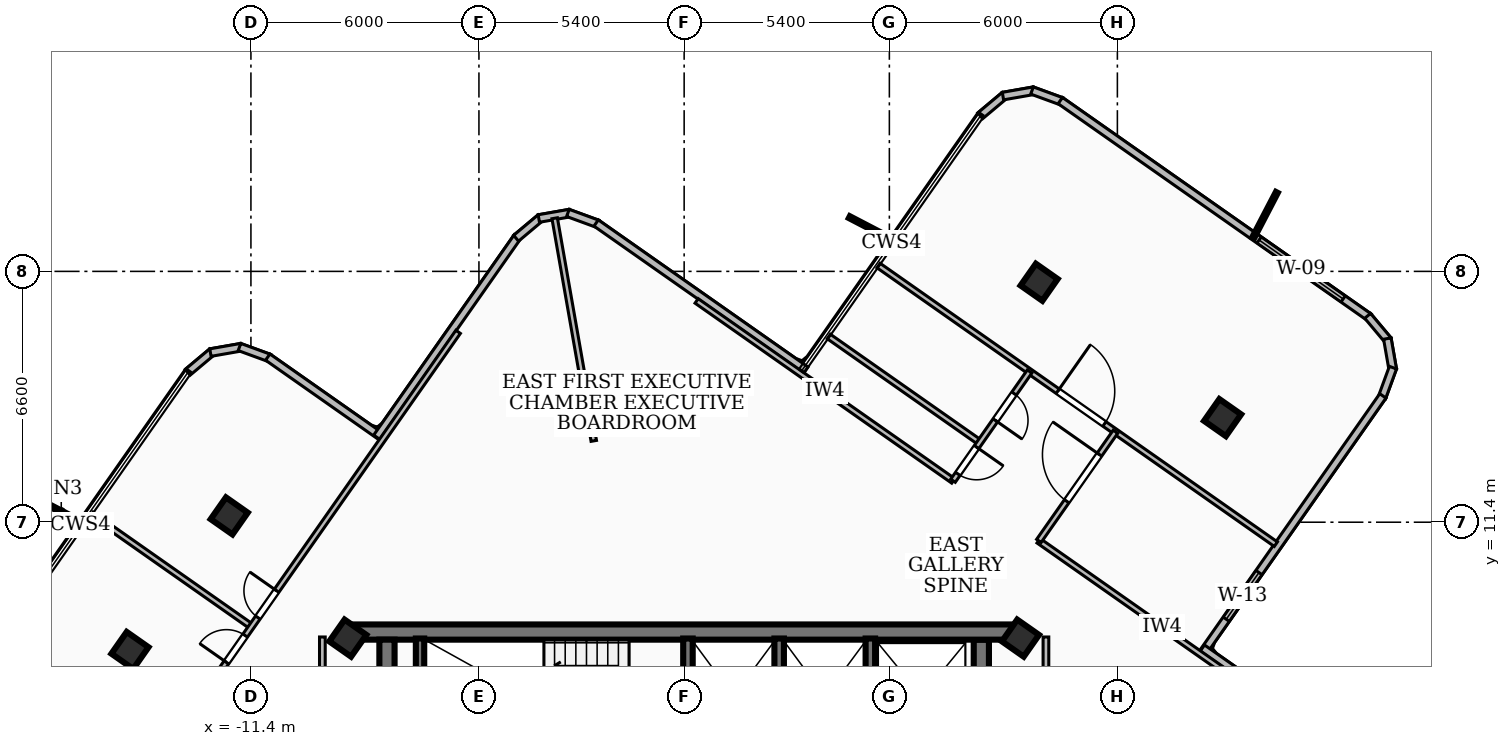
"""IFC4 building model, lengths in metres.
Left out: names, types, materials, properties, quantities, classifications, styles, units other than length and angle.
Written with IfcOpenShell. Run it as: python <this file> out.ifc"""

import sys

from ifc_helpers import new_model, si_unit, direction, frame, frame_2d, origin, origin_2d, place, context, subcontext, project, spatial, rectangle, extrude, element, fill, save


model = new_model("IFC4")
c1 = context("Model", 3, precision=1e-05, world=origin(), true_north=direction((0.0, 1.0)))
c2 = subcontext(c1, "Body", "Model", "MODEL_VIEW")
j1 = project(units=[si_unit("LENGTHUNIT", "METRE"), si_unit("PLANEANGLEUNIT", "RADIAN")], contexts=[c1])
p1 = place(None, origin())
s1 = spatial("IfcSite", under=j1, at=p1, CompositionType="ELEMENT")
p2 = place(p1, origin())
s2 = spatial("IfcBuilding", under=s1, at=p2, CompositionType="ELEMENT")
p3 = place(p2, frame((0.0, 0.0, 268.02)))
s3 = spatial("IfcBuildingStorey", under=s2, at=p3, CompositionType="ELEMENT", Elevation=268.02)
p4 = place(p3, frame((-8.78, 8.51, 0.0), z_axis=(0.0, 0.0, 1.0), x_axis=(1.0, 0.0, 0.0)))
e1 = element("IfcWall", 1, at=p4, inside=s3, PredefinedType="SHEAR", context=c2, shape_type="SweptSolid", body=[
    extrude(rectangle(XDim=17.56, YDim=0.4, at=frame_2d((8.78, 0.0))), origin(), (0.0, 0.0, 1.0), 3.16),
])
for number, where, z_axis, x_axis in (
    (2, (-7.82, 1.95, 0.0), (0.0, 0.0, 1.0), (0.0, 1.0, 0.0)),
    (3, (7.82, 8.31, 0.0), (0.0, 0.0, 1.0), (0.0, -1.0, 0.0)),
):
    element("IfcWall", number, at=place(p3, frame(where, z_axis=z_axis, x_axis=x_axis)), inside=s3, PredefinedType="SHEAR", context=c2, shape_type="SweptSolid", body=[
        extrude(rectangle(XDim=6.36, YDim=0.4, at=frame_2d((3.18, 0.0))), origin(), (0.0, 0.0, 1.0), 3.16),
    ])
p5 = place(p3, frame((-6.95, 5.28, 0.0), z_axis=(0.0, 0.0, 1.0), x_axis=(0.0, 1.0, 0.0)))
e4 = element("IfcWall", 4, at=p5, inside=s3, PredefinedType="SOLIDWALL", context=c2, shape_type="SweptSolid", body=[
    extrude(rectangle(XDim=3.06, YDim=0.22, at=frame_2d((1.53, 0.0))), origin(), (0.0, 0.0, 1.0), 3.16),
])
for number, where, z_axis, x_axis in (
    (5, (0.1, 5.3, 0.0), (0.0, 0.0, 1.0), (0.0, 1.0, 0.0)),
    (6, (2.5, 5.3, 0.0), (0.0, 0.0, 1.0), (0.0, 1.0, 0.0)),
    (7, (4.9, 5.3, 0.0), (0.0, 0.0, 1.0), (0.0, 1.0, 0.0)),
):
    element("IfcWall", number, at=place(p3, frame(where, z_axis=z_axis, x_axis=x_axis)), inside=s3, PredefinedType="SOLIDWALL", context=c2, shape_type="SweptSolid", body=[
        extrude(rectangle(XDim=3.04, YDim=0.25, at=frame_2d((1.52, 0.0))), origin(), (0.0, 0.0, 1.0), 3.16),
    ])
for number, where, z_axis, x_axis in (
    (8, (-8.85, 8.35, 0.0), (0.0, 0.0, 1.0), (0.574, 0.819, 0.0)),
    (9, (8.85, 8.35, 0.0), (0.0, 0.0, 1.0), (0.574, 0.819, 0.0)),
    (10, (14.169, 14.152, 0.0), (0.0, 0.0, 1.0), (0.574, 0.819, 0.0)),
    (11, (9.341, 17.714, 0.0), (0.0, 0.0, 1.0), (0.574, 0.819, 0.0)),
    (12, (-11.971, 11.566, 0.0), (0.0, 0.0, 1.0), (0.574, 0.819, 0.0)),
    (13, (-14.583, 8.026, 0.0), (0.0, 0.0, 1.0), (0.574, 0.819, 0.0)),
):
    element("IfcColumn", number, at=place(p3, frame(where, z_axis=z_axis, x_axis=x_axis)), inside=s3, PredefinedType="COLUMN", context=c2, shape_type="SweptSolid", body=[
        extrude(rectangle(XDim=0.7, YDim=0.7, at=origin_2d()), origin(), (0.0, 0.0, 1.0), 3.42),
    ])
p6 = place(p3, frame((-13.064, 15.345, 0.0), z_axis=(0.0, 0.0, 1.0), x_axis=(0.766330415365, 0.642446647191, 0.0)))
e14 = element("IfcWall", 14, at=p6, inside=s3, PredefinedType="SOLIDWALL", context=c2, shape_type="SweptSolid", body=[
    extrude(rectangle(XDim=0.838, YDim=0.2, at=frame_2d((0.419, 0.0))), origin(), (0.0, 0.0, 1.0), 3.16),
])
p7 = place(p3, frame((-12.466, 15.863, 0.0), z_axis=(0.0, 0.0, 1.0), x_axis=(0.985118245285, 0.171877988141, 0.0)))
e15 = element("IfcWall", 15, at=p7, inside=s3, PredefinedType="SOLIDWALL", context=c2, shape_type="SweptSolid", body=[
    extrude(rectangle(XDim=0.825, YDim=0.2, at=frame_2d((0.413, 0.0))), origin(), (0.0, 0.0, 1.0), 3.16),
])
p8 = place(p3, frame((-11.701, 16.01, 0.0), z_axis=(0.0, 0.0, 1.0), x_axis=(0.939042573482, -0.343800880145, 0.0)))
e16 = element("IfcWall", 16, at=p8, inside=s3, PredefinedType="SOLIDWALL", context=c2, shape_type="SweptSolid", body=[
    extrude(rectangle(XDim=0.838, YDim=0.2, at=frame_2d((0.419, 0.0))), origin(), (0.0, 0.0, 1.0), 3.16),
])
p9 = place(p3, frame((-10.957, 15.745, 0.0), z_axis=(0.0, 0.0, 1.0), x_axis=(0.818576054501, -0.574398157202, 0.0)))
e17 = element("IfcWall", 17, at=p9, inside=s3, PredefinedType="SOLIDWALL", context=c2, shape_type="SweptSolid", body=[
    extrude(rectangle(XDim=3.64, YDim=0.2, at=frame_2d((1.82, 0.0))), origin(), (0.0, 0.0, 1.0), 3.16),
])
p10 = place(p3, frame((-8.088, 13.635, 0.0), z_axis=(0.0, 0.0, 1.0), x_axis=(0.574286279317, 0.818654548261, 0.0)))
e18 = element("IfcWall", 18, at=p10, inside=s3, PredefinedType="SOLIDWALL", context=c2, shape_type="SweptSolid", body=[
    extrude(rectangle(XDim=6.441, YDim=0.2, at=frame_2d((3.22, 0.0))), origin(), (0.0, 0.0, 1.0), 3.16),
])
p11 = place(p3, frame((-4.422, 18.872, 0.0), z_axis=(0.0, 0.0, 1.0), x_axis=(0.766020352528, 0.642816318642, 0.0)))
e19 = element("IfcWall", 19, at=p11, inside=s3, PredefinedType="SOLIDWALL", context=c2, shape_type="SweptSolid", body=[
    extrude(rectangle(XDim=0.838, YDim=0.2, at=frame_2d((0.419, 0.0))), origin(), (0.0, 0.0, 1.0), 3.16),
])
p12 = place(p3, frame((-3.824, 19.391, 0.0), z_axis=(0.0, 0.0, 1.0), x_axis=(0.985118245285, 0.171877988141, 0.0)))
e20 = element("IfcWall", 20, at=p12, inside=s3, PredefinedType="SOLIDWALL", context=c2, shape_type="SweptSolid", body=[
    extrude(rectangle(XDim=0.825, YDim=0.2, at=frame_2d((0.413, 0.0))), origin(), (0.0, 0.0, 1.0), 3.16),
])
p13 = place(p3, frame((-3.059, 19.538, 0.0), z_axis=(0.0, 0.0, 1.0), x_axis=(0.938939131905, -0.344083284363, 0.0)))
e21 = element("IfcWall", 21, at=p13, inside=s3, PredefinedType="SOLIDWALL", context=c2, shape_type="SweptSolid", body=[
    extrude(rectangle(XDim=0.837, YDim=0.2, at=frame_2d((0.418, 0.0))), origin(), (0.0, 0.0, 1.0), 3.16),
])
p14 = place(p3, frame((-2.316, 19.273, 0.0), z_axis=(0.0, 0.0, 1.0), x_axis=(0.818695592978, -0.574227764949, 0.0)))
e22 = element("IfcWall", 22, at=p14, inside=s3, PredefinedType="SOLIDWALL", context=c2, shape_type="SweptSolid", body=[
    extrude(rectangle(XDim=6.741, YDim=0.2, at=frame_2d((3.371, 0.0))), origin(), (0.0, 0.0, 1.0), 3.16),
])
p15 = place(p3, frame((7.791, 22.094, 0.0), z_axis=(0.0, 0.0, 1.0), x_axis=(0.766450684477, 0.642303159159, 0.0)))
e23 = element("IfcWall", 23, at=p15, inside=s3, PredefinedType="SOLIDWALL", context=c2, shape_type="SweptSolid", body=[
    extrude(rectangle(XDim=0.838, YDim=0.2, at=frame_2d((0.419, 0.0))), origin(), (0.0, 0.0, 1.0), 3.16),
])
p16 = place(p3, frame((8.389, 22.612, 0.0), z_axis=(0.0, 0.0, 1.0), x_axis=(0.985118245285, 0.171877988141, 0.0)))
e24 = element("IfcWall", 24, at=p16, inside=s3, PredefinedType="SOLIDWALL", context=c2, shape_type="SweptSolid", body=[
    extrude(rectangle(XDim=0.825, YDim=0.2, at=frame_2d((0.413, 0.0))), origin(), (0.0, 0.0, 1.0), 3.16),
])
p17 = place(p3, frame((9.154, 22.759, 0.0), z_axis=(0.0, 0.0, 1.0), x_axis=(0.939042573482, -0.343800880145, 0.0)))
e25 = element("IfcWall", 25, at=p17, inside=s3, PredefinedType="SOLIDWALL", context=c2, shape_type="SweptSolid", body=[
    extrude(rectangle(XDim=0.838, YDim=0.2, at=frame_2d((0.419, 0.0))), origin(), (0.0, 0.0, 1.0), 3.16),
])
p18 = place(p3, frame((9.898, 22.494, 0.0), z_axis=(0.0, 0.0, 1.0), x_axis=(0.818760017785, -0.5741359014, 0.0)))
e26 = element("IfcWall", 26, at=p18, inside=s3, PredefinedType="SOLIDWALL", context=c2, shape_type="SweptSolid", body=[
    extrude(rectangle(XDim=9.922, YDim=0.2, at=frame_2d((4.961, 0.0))), origin(), (0.0, 0.0, 1.0), 3.16),
])
p19 = place(p18, frame((6.39, 0.0, 0.85)))
e27 = element("IfcOpeningElement", 27, at=p19, cuts=e26, PredefinedType="OPENING", context=c2, shape_type="SweptSolid", body=[
    extrude(rectangle(XDim=2.7, YDim=1.65, at=frame_2d((1.35, 0.825))), frame((0.0, 0.11, 0.0), z_axis=(0.0, -1.0, 0.0), x_axis=(1.0, 0.0, 0.0)), (0.0, 0.0, 1.0), 0.22),
])
p20 = place(p3, frame((17.986, 16.83, 0.0), z_axis=(0.0, 0.0, 1.0), x_axis=(0.642131913787, -0.766594159446, 0.0)))
e28 = element("IfcWall", 28, at=p20, inside=s3, PredefinedType="SOLIDWALL", context=c2, shape_type="SweptSolid", body=[
    extrude(rectangle(XDim=0.838, YDim=0.2, at=frame_2d((0.419, 0.0))), origin(), (0.0, 0.0, 1.0), 3.16),
])
p21 = place(p3, frame((18.504, 16.232, 0.0), z_axis=(0.0, 0.0, 1.0), x_axis=(0.172165058078, -0.985068115806, 0.0)))
e29 = element("IfcWall", 29, at=p21, inside=s3, PredefinedType="SOLIDWALL", context=c2, shape_type="SweptSolid", body=[
    extrude(rectangle(XDim=0.825, YDim=0.2, at=frame_2d((0.413, 0.0))), origin(), (0.0, 0.0, 1.0), 3.16),
])
p22 = place(p3, frame((18.651, 15.467, 0.0), z_axis=(0.0, 0.0, 1.0), x_axis=(-0.343826172689, -0.939033313027, 0.0)))
e30 = element("IfcWall", 30, at=p22, inside=s3, PredefinedType="SOLIDWALL", context=c2, shape_type="SweptSolid", body=[
    extrude(rectangle(XDim=0.837, YDim=0.2, at=frame_2d((0.418, 0.0))), origin(), (0.0, 0.0, 1.0), 3.16),
])
p23 = place(p3, frame((18.386, 14.724, 0.0), z_axis=(0.0, 0.0, 1.0), x_axis=(-0.574193796103, -0.818719417454, 0.0)))
e31 = element("IfcWall", 31, at=p23, inside=s3, PredefinedType="SOLIDWALL", context=c2, shape_type="SweptSolid", body=[
    extrude(rectangle(XDim=8.241, YDim=0.2, at=frame_2d((4.121, 0.0))), origin(), (0.0, 0.0, 1.0), 3.16),
])
p24 = place(p23, frame((5.678, 0.0, 0.85)))
e32 = element("IfcOpeningElement", 32, at=p24, cuts=e31, PredefinedType="OPENING", context=c2, shape_type="SweptSolid", body=[
    extrude(rectangle(XDim=1.5, YDim=1.8, at=frame_2d((0.75, 0.9))), frame((0.0, 0.11, 0.0), z_axis=(0.0, -1.0, 0.0), x_axis=(1.0, 0.0, 0.0)), (0.0, 0.0, 1.0), 0.22),
])
p25 = place(p3, frame((13.635, 8.088, 0.0), z_axis=(0.0, 0.0, 1.0), x_axis=(0.818654548261, -0.574286279317, 0.0)))
e33 = element("IfcWall", 33, at=p25, inside=s3, PredefinedType="SOLIDWALL", context=c2, shape_type="SweptSolid", body=[
    extrude(rectangle(XDim=6.441, YDim=0.2, at=frame_2d((3.22, 0.0))), origin(), (0.0, 0.0, 1.0), 3.16),
])
p26 = place(p3, frame((-9.52, 1.75, 0.0), z_axis=(0.0, 0.0, 1.0), x_axis=(0.0, 1.0, 0.0)))
e34 = element("IfcWall", 34, at=p26, inside=s3, PredefinedType="PARTITIONING", context=c2, shape_type="SweptSolid", body=[
    extrude(rectangle(XDim=6.63, YDim=0.15, at=frame_2d((3.315, 0.0))), origin(), (0.0, 0.0, 1.0), 2.53),
])
p27 = place(p3, frame((9.52, 1.75, 0.0), z_axis=(0.0, 0.0, 1.0), x_axis=(0.0, 1.0, 0.0)))
e35 = element("IfcWall", 35, at=p27, inside=s3, PredefinedType="PARTITIONING", context=c2, shape_type="SweptSolid", body=[
    extrude(rectangle(XDim=6.63, YDim=0.15, at=frame_2d((3.315, 0.0))), origin(), (0.0, 0.0, 1.0), 3.16),
])
p28 = place(p3, frame((-2.378, 13.54, 0.0), z_axis=(0.0, 0.0, 1.0), x_axis=(-0.173019547247, 0.984918390665, 0.0)))
e36 = element("IfcWall", 36, at=p28, inside=s3, PredefinedType="PARTITIONING", context=c2, shape_type="SweptSolid", body=[
    extrude(rectangle(XDim=5.948, YDim=0.145, at=frame_2d((2.974, 0.0))), origin(), (0.0, 0.0, 1.0), 3.16),
])
p29 = place(p3, frame((7.083, 12.487, 0.0), z_axis=(0.0, 0.0, 1.0), x_axis=(-0.818818791344, 0.574052076855, 0.0)))
e37 = element("IfcWall", 37, at=p29, inside=s3, PredefinedType="PARTITIONING", context=c2, shape_type="SweptSolid", body=[
    extrude(rectangle(XDim=8.25, YDim=0.145, at=frame_2d((4.125, 0.0))), origin(), (0.0, 0.0, 1.0), 3.16),
])
p30 = place(p3, frame((15.835, 6.349, 0.0), z_axis=(0.0, 0.0, 1.0), x_axis=(-0.818780073776, 0.57410729902, 0.0)))
e38 = element("IfcWall", 38, at=p30, inside=s3, PredefinedType="PARTITIONING", context=c2, shape_type="SweptSolid", body=[
    extrude(rectangle(XDim=7.95, YDim=0.145, at=frame_2d((3.975, 0.0))), origin(), (0.0, 0.0, 1.0), 2.53),
])
p31 = place(p3, frame((7.765, 13.511, 0.0), z_axis=(0.0, 0.0, 1.0), x_axis=(-0.818761977847, 0.574133106198, 0.0)))
e39 = element("IfcWall", 39, at=p31, inside=s3, PredefinedType="PARTITIONING", context=c2, shape_type="SweptSolid", body=[
    extrude(rectangle(XDim=4.835, YDim=0.145, at=frame_2d((2.418, 0.0))), origin(), (0.0, 0.0, 1.0), 3.16),
])
p32 = place(p3, frame((9.09, 15.366, 0.0), z_axis=(0.0, 0.0, 1.0), x_axis=(-0.574097025606, -0.81878727713, 0.0)))
e40 = element("IfcWall", 40, at=p32, inside=s3, PredefinedType="PARTITIONING", context=c2, shape_type="SweptSolid", body=[
    extrude(rectangle(XDim=3.51, YDim=0.145, at=frame_2d((1.755, 0.0))), origin(), (0.0, 0.0, 1.0), 3.16),
])
p33 = place(p32, frame((2.43, 0.0, 0.0)))
e41 = element("IfcOpeningElement", 41, at=p33, cuts=e40, PredefinedType="OPENING", context=c2, shape_type="SweptSolid", body=[
    extrude(rectangle(XDim=0.86, YDim=2.04, at=frame_2d((0.43, 1.02))), frame((0.0, 0.083, 0.0), z_axis=(0.0, -1.0, 0.0), x_axis=(1.0, 0.0, 0.0)), (0.0, 0.0, 1.0), 0.165),
])
p34 = place(p32, frame((0.71, 0.0, 0.0)))
e42 = element("IfcOpeningElement", 42, at=p34, cuts=e40, PredefinedType="OPENING", context=c2, shape_type="SweptSolid", body=[
    extrude(rectangle(XDim=0.86, YDim=2.04, at=frame_2d((0.43, 1.02))), frame((0.0, 0.083, 0.0), z_axis=(0.0, -1.0, 0.0), x_axis=(1.0, 0.0, 0.0)), (0.0, 0.0, 1.0), 0.165),
])
p35 = place(p3, frame((9.334, 10.908, 0.0), z_axis=(0.0, 0.0, 1.0), x_axis=(0.574414301793, 0.818564725539, 0.0)))
e43 = element("IfcWall", 43, at=p35, inside=s3, PredefinedType="PARTITIONING", context=c2, shape_type="SweptSolid", body=[
    extrude(rectangle(XDim=3.51, YDim=0.145, at=frame_2d((1.755, 0.0))), origin(), (0.0, 0.0, 1.0), 3.16),
])
p36 = place(p35, frame((1.275, 0.0, 0.0)))
e44 = element("IfcOpeningElement", 44, at=p36, cuts=e43, PredefinedType="OPENING", context=c2, shape_type="SweptSolid", body=[
    extrude(rectangle(XDim=1.5, YDim=2.12, at=frame_2d((0.75, 1.06))), frame((0.0, 0.083, 0.0), z_axis=(0.0, -1.0, 0.0), x_axis=(1.0, 0.0, 0.0)), (0.0, 0.0, 1.0), 0.165),
])
p37 = place(p3, frame((5.115, 18.154, 0.0), z_axis=(0.0, 0.0, 1.0), x_axis=(0.818735813326, -0.574170417191, 0.0)))
e45 = element("IfcWall", 45, at=p37, inside=s3, PredefinedType="PARTITIONING", context=c2, shape_type="SweptSolid", body=[
    extrude(rectangle(XDim=12.77, YDim=0.145, at=frame_2d((6.385, 0.0))), origin(), (0.0, 0.0, 1.0), 2.53),
])
p38 = place(p37, frame((5.76, 0.0, 0.0)))
e46 = element("IfcOpeningElement", 46, at=p38, cuts=e45, PredefinedType="OPENING", context=c2, shape_type="SweptSolid", body=[
    extrude(rectangle(XDim=1.5, YDim=2.12, at=frame_2d((0.75, 1.06))), frame((0.0, 0.083, 0.0), z_axis=(0.0, -1.0, 0.0), x_axis=(1.0, 0.0, 0.0)), (0.0, 0.0, 1.0), 0.165),
])
p39 = place(p3, frame((-11.433, 8.689, 0.0), z_axis=(0.0, 0.0, 1.0), x_axis=(-0.81868341552, 0.574245126363, 0.0)))
e47 = element("IfcWall", 47, at=p39, inside=s3, PredefinedType="PARTITIONING", context=c2, shape_type="SweptSolid", body=[
    extrude(rectangle(XDim=5.085, YDim=0.145, at=frame_2d((2.542, 0.0))), origin(), (0.0, 0.0, 1.0), 3.16),
])
p40 = place(p3, frame((-17.625, -0.245, 0.0), z_axis=(0.0, 0.0, 1.0), x_axis=(0.574126736534, 0.818766444352, 0.0)))
e48 = element("IfcWall", 48, at=p40, inside=s3, PredefinedType="PARTITIONING", context=c2, shape_type="SweptSolid", body=[
    extrude(rectangle(XDim=20.34, YDim=0.145, at=frame_2d((10.17, 0.0))), origin(), (0.0, 0.0, 1.0), 2.53),
])
p41 = place(p40, frame((11.16, 0.0, 0.0)))
e49 = element("IfcOpeningElement", 49, at=p41, cuts=e48, PredefinedType="OPENING", context=c2, shape_type="SweptSolid", body=[
    extrude(rectangle(XDim=0.86, YDim=2.04, at=frame_2d((0.43, 1.02))), frame((0.0, 0.083, 0.0), z_axis=(0.0, -1.0, 0.0), x_axis=(1.0, 0.0, 0.0)), (0.0, 0.0, 1.0), 0.165),
])
p42 = place(p40, frame((9.72, 0.0, 0.0)))
e50 = element("IfcOpeningElement", 50, at=p42, cuts=e48, PredefinedType="OPENING", context=c2, shape_type="SweptSolid", body=[
    extrude(rectangle(XDim=0.86, YDim=2.04, at=frame_2d((0.43, 1.02))), frame((0.0, 0.083, 0.0), z_axis=(0.0, -1.0, 0.0), x_axis=(1.0, 0.0, 0.0)), (0.0, 0.0, 1.0), 0.165),
])
p43 = place(p19, origin())
e51 = element("IfcWindow", 51, at=p43, inside=s3, PartitioningType="SINGLE_PANEL", PredefinedType="WINDOW", context=c2, shape_type="SweptSolid", body=[
    extrude(rectangle(XDim=2.7, YDim=1.65, at=frame_2d((1.35, 0.825))), frame((0.0, 0.03, 0.0), z_axis=(0.0, -1.0, 0.0), x_axis=(1.0, 0.0, 0.0)), (0.0, 0.0, 1.0), 0.06),
])
fill(e27, e51)
p44 = place(p24, origin())
e52 = element("IfcWindow", 52, at=p44, inside=s3, PartitioningType="SINGLE_PANEL", PredefinedType="WINDOW", context=c2, shape_type="SweptSolid", body=[
    extrude(rectangle(XDim=1.5, YDim=1.8, at=frame_2d((0.75, 0.9))), frame((0.0, 0.03, 0.0), z_axis=(0.0, -1.0, 0.0), x_axis=(1.0, 0.0, 0.0)), (0.0, 0.0, 1.0), 0.06),
])
fill(e32, e52)
p45 = place(p33, origin())
e53 = element("IfcDoor", 53, at=p45, inside=s3, OperationType="SINGLE_SWING_LEFT", PredefinedType="DOOR", context=c2, shape_type="SweptSolid", body=[
    extrude(rectangle(XDim=0.86, YDim=2.04, at=frame_2d((0.43, 1.02))), frame((0.0, 0.025, 0.0), z_axis=(0.0, -1.0, 0.0), x_axis=(1.0, 0.0, 0.0)), (0.0, 0.0, 1.0), 0.05),
])
fill(e41, e53)
p46 = place(p34, origin())
e54 = element("IfcDoor", 54, at=p46, inside=s3, OperationType="SINGLE_SWING_RIGHT", PredefinedType="DOOR", context=c2, shape_type="SweptSolid", body=[
    extrude(rectangle(XDim=0.86, YDim=2.04, at=frame_2d((0.43, 1.02))), frame((0.0, 0.025, 0.0), z_axis=(0.0, -1.0, 0.0), x_axis=(1.0, 0.0, 0.0)), (0.0, 0.0, 1.0), 0.05),
])
fill(e42, e54)
p47 = place(p36, origin())
e55 = element("IfcDoor", 55, at=p47, inside=s3, OperationType="SINGLE_SWING_RIGHT", PredefinedType="DOOR", context=c2, shape_type="SweptSolid", body=[
    extrude(rectangle(XDim=1.5, YDim=2.12, at=frame_2d((0.75, 1.06))), frame((0.0, 0.025, 0.0), z_axis=(0.0, -1.0, 0.0), x_axis=(1.0, 0.0, 0.0)), (0.0, 0.0, 1.0), 0.05),
])
fill(e44, e55)
p48 = place(p38, origin())
e56 = element("IfcDoor", 56, at=p48, inside=s3, OperationType="SINGLE_SWING_LEFT", PredefinedType="DOOR", context=c2, shape_type="SweptSolid", body=[
    extrude(rectangle(XDim=1.5, YDim=2.12, at=frame_2d((0.75, 1.06))), frame((0.0, 0.025, 0.0), z_axis=(0.0, -1.0, 0.0), x_axis=(1.0, 0.0, 0.0)), (0.0, 0.0, 1.0), 0.05),
])
fill(e46, e56)
p49 = place(p41, origin())
e57 = element("IfcDoor", 57, at=p49, inside=s3, OperationType="SINGLE_SWING_RIGHT", PredefinedType="DOOR", context=c2, shape_type="SweptSolid", body=[
    extrude(rectangle(XDim=0.86, YDim=2.04, at=frame_2d((0.43, 1.02))), frame((0.0, 0.025, 0.0), z_axis=(0.0, -1.0, 0.0), x_axis=(1.0, 0.0, 0.0)), (0.0, 0.0, 1.0), 0.05),
])
fill(e49, e57)
p50 = place(p42, origin())
e58 = element("IfcDoor", 58, at=p50, inside=s3, OperationType="SINGLE_SWING_LEFT", PredefinedType="DOOR", context=c2, shape_type="SweptSolid", body=[
    extrude(rectangle(XDim=0.86, YDim=2.04, at=frame_2d((0.43, 1.02))), frame((0.0, 0.025, 0.0), z_axis=(0.0, -1.0, 0.0), x_axis=(1.0, 0.0, 0.0)), (0.0, 0.0, 1.0), 0.05),
])
fill(e50, e58)
save(model, sys.argv[1])
